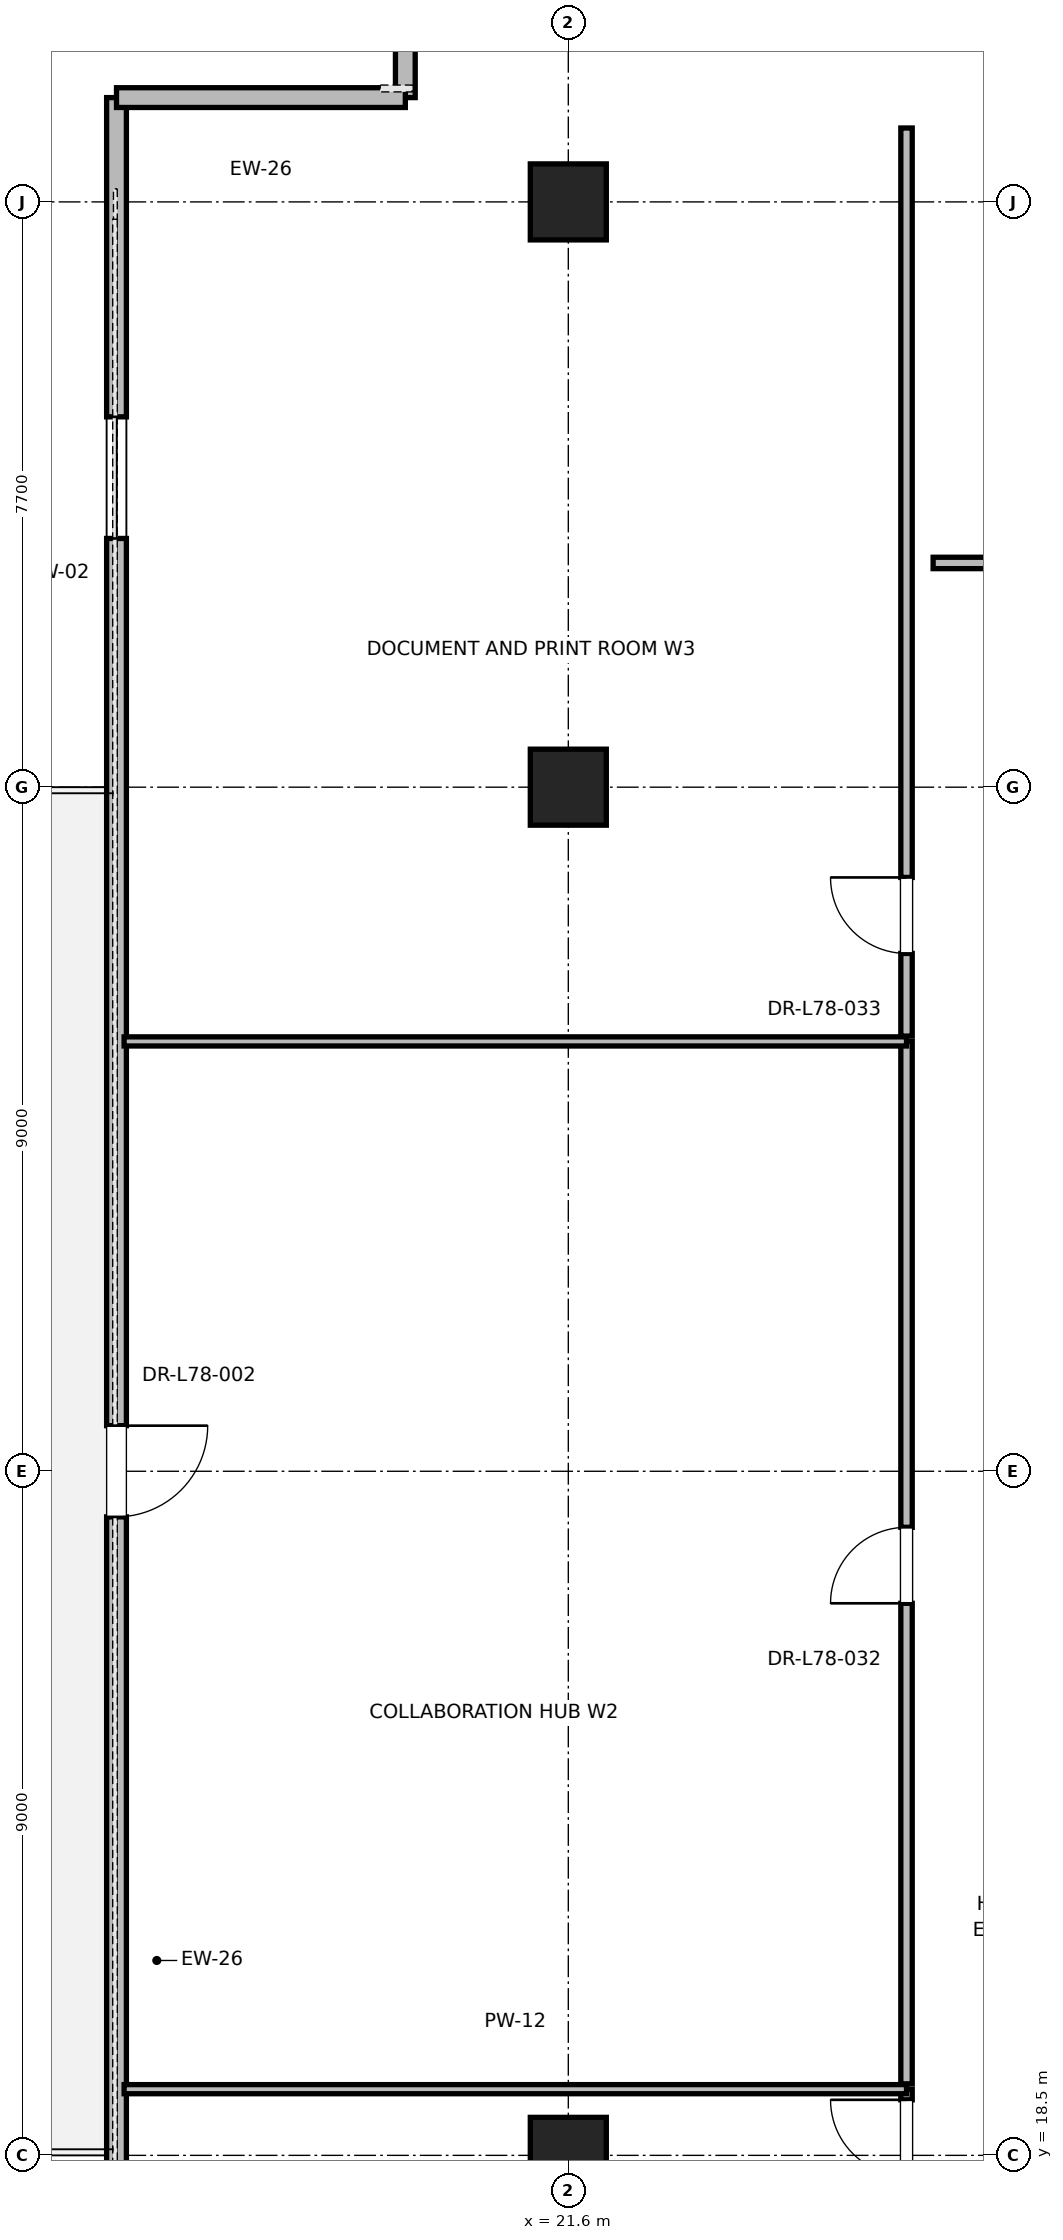
"""IFC4 building model, lengths in metres.
Left out: names, types, materials, properties, quantities, classifications, styles, units other than length and angle.
Written with IfcOpenShell. Run it as: python <this file> out.ifc"""

import sys

from ifc_helpers import new_model, si_unit, direction, frame, frame_2d, origin, origin_2d, place, context, subcontext, project, spatial, rectangle, extrude, element, fill, save


model = new_model("IFC4")
c1 = context("Model", 3, precision=1e-05, world=origin(), true_north=direction((0.0, 1.0)))
c2 = subcontext(c1, "Body", "Model", "MODEL_VIEW")
j1 = project(units=[si_unit("LENGTHUNIT", "METRE"), si_unit("PLANEANGLEUNIT", "RADIAN")], contexts=[c1])
p1 = place(None, origin())
s1 = spatial("IfcSite", under=j1, at=p1, CompositionType="ELEMENT")
p2 = place(p1, origin())
s2 = spatial("IfcBuilding", under=s1, at=p2, CompositionType="ELEMENT")
p3 = place(p2, frame((0.0, 0.0, 334.8)))
s3 = spatial("IfcBuildingStorey", under=s2, at=p3, CompositionType="ELEMENT", Elevation=334.8)
for number, where, z_axis, x_axis in (
    (1, (21.6, 18.5, 0.0), (0.0, 0.0, 1.0), (1.0, 0.0, 0.0)),
    (2, (21.6, 36.5, 0.0), (0.0, 0.0, 1.0), (1.0, 0.0, 0.0)),
    (3, (21.6, 44.2, 0.0), (0.0, 0.0, 1.0), (1.0, 0.0, 0.0)),
):
    element("IfcColumn", number, at=place(p3, frame(where, z_axis=z_axis, x_axis=x_axis)), inside=s3, PredefinedType="COLUMN", context=c2, shape_type="SweptSolid", body=[
        extrude(rectangle(XDim=1.0, YDim=1.0, at=origin_2d()), origin(), (0.0, 0.0, 1.0), 4.0),
    ])
p4 = place(p3, frame((15.656, 45.572, 0.0), z_axis=(0.0, 0.0, 1.0), x_axis=(0.0, -1.0, 0.0)))
e4 = element("IfcWall", 4, at=p4, inside=s3, PredefinedType="PARAPET", context=c2, shape_type="SweptSolid", body=[
    extrude(rectangle(XDim=36.145, YDim=0.26, at=frame_2d((18.072, 0.0))), origin(), (0.0, 0.0, 1.0), 3.196),
])
p5 = place(p4, frame((4.2, 0.0, 0.85)))
e5 = element("IfcOpeningElement", 5, at=p5, cuts=e4, PredefinedType="OPENING", context=c2, shape_type="SweptSolid", body=[
    extrude(rectangle(XDim=1.6, YDim=2.1, at=frame_2d((0.8, 1.05))), frame((0.0, 0.13, 0.0), z_axis=(0.0, -1.0, 0.0), x_axis=(1.0, 0.0, 0.0)), (0.0, 0.0, 1.0), 0.26),
])
p6 = place(p4, frame((17.472, 0.0, 0.0)))
e6 = element("IfcOpeningElement", 6, at=p6, cuts=e4, PredefinedType="OPENING", context=c2, shape_type="SweptSolid", body=[
    extrude(rectangle(XDim=1.2, YDim=2.2, at=frame_2d((0.6, 1.1))), frame((0.0, 0.13, 0.0), z_axis=(0.0, -1.0, 0.0), x_axis=(1.0, 0.0, 0.0)), (0.0, 0.0, 1.0), 0.26),
])
p7 = place(p4, frame((30.344, 0.0, 0.85)))
e7 = element("IfcOpeningElement", 7, at=p7, cuts=e4, PredefinedType="OPENING", context=c2, shape_type="SweptSolid", body=[
    extrude(rectangle(XDim=1.6, YDim=2.1, at=frame_2d((0.8, 1.05))), frame((0.0, 0.13, 0.0), z_axis=(0.0, -1.0, 0.0), x_axis=(1.0, 0.0, 0.0)), (0.0, 0.0, 1.0), 0.26),
])
p8 = place(p3, frame((19.456, 48.872, 0.0), z_axis=(0.0, 0.0, 1.0), x_axis=(0.0, -1.0, 0.0)))
e8 = element("IfcWall", 8, at=p8, inside=s3, PredefinedType="PARAPET", context=c2, shape_type="SweptSolid", body=[
    extrude(rectangle(XDim=3.3, YDim=0.26, at=frame_2d((1.65, 0.0))), origin(), (0.0, 0.0, 1.0), 3.785),
])
p9 = place(p8, frame((0.75, 0.0, 0.85)))
e9 = element("IfcOpeningElement", 9, at=p9, cuts=e8, PredefinedType="OPENING", context=c2, shape_type="SweptSolid", body=[
    extrude(rectangle(XDim=1.8, YDim=2.2, at=frame_2d((0.9, 1.1))), frame((0.0, 0.13, 0.0), z_axis=(0.0, -1.0, 0.0), x_axis=(1.0, 0.0, 0.0)), (0.0, 0.0, 1.0), 0.26),
])
p10 = place(p3, frame((19.456, 45.572, 0.0), z_axis=(0.0, 0.0, 1.0), x_axis=(-1.0, 0.0, 0.0)))
e10 = element("IfcWall", 10, at=p10, inside=s3, PredefinedType="PARAPET", context=c2, shape_type="SweptSolid", body=[
    extrude(rectangle(XDim=3.8, YDim=0.26, at=frame_2d((1.9, 0.0))), origin(), (0.0, 0.0, 1.0), 3.785),
])
p11 = place(p3, frame((26.4, 39.45, 0.0), z_axis=(0.0, 0.0, 1.0), x_axis=(1.0, 0.0, 0.0)))
e11 = element("IfcWall", 11, at=p11, inside=s3, PredefinedType="PARTITIONING", context=c2, shape_type="SweptSolid", body=[
    extrude(rectangle(XDim=3.808, YDim=0.15, at=frame_2d((1.904, 0.0))), origin(), (0.0, 0.0, 1.0), 2.85),
])
p12 = place(p11, frame((1.419, 0.0, 0.0)))
e12 = element("IfcOpeningElement", 12, at=p12, cuts=e11, PredefinedType="OPENING", context=c2, shape_type="SweptSolid", body=[
    extrude(rectangle(XDim=1.0, YDim=2.15, at=frame_2d((0.5, 1.075))), frame((0.0, 0.075, 0.0), z_axis=(0.0, -1.0, 0.0), x_axis=(1.0, 0.0, 0.0)), (0.0, 0.0, 1.0), 0.15),
])
p13 = place(p3, frame((26.05, 9.828, 0.0), z_axis=(0.0, 0.0, 1.0), x_axis=(0.0, 1.0, 0.0)))
e13 = element("IfcWall", 13, at=p13, inside=s3, PredefinedType="PARTITIONING", context=c2, shape_type="SweptSolid", body=[
    extrude(rectangle(XDim=9.543, YDim=0.15, at=frame_2d((4.771, 0.0))), origin(), (0.0, 0.0, 1.0), 2.85),
])
p14 = place(p13, frame((8.403, 0.0, 0.0)))
e14 = element("IfcOpeningElement", 14, at=p14, cuts=e13, PredefinedType="OPENING", context=c2, shape_type="SweptSolid", body=[
    extrude(rectangle(XDim=1.0, YDim=2.15, at=frame_2d((0.5, 1.075))), frame((0.0, 0.075, 0.0), z_axis=(0.0, -1.0, 0.0), x_axis=(1.0, 0.0, 0.0)), (0.0, 0.0, 1.0), 0.15),
])
p15 = place(p3, frame((15.756, 19.371, 0.0), z_axis=(0.0, 0.0, 1.0), x_axis=(1.0, 0.0, 0.0)))
e15 = element("IfcWall", 15, at=p15, inside=s3, PredefinedType="PARTITIONING", context=c2, shape_type="SweptSolid", body=[
    extrude(rectangle(XDim=10.294, YDim=0.12, at=frame_2d((5.147, 0.0))), origin(), (0.0, 0.0, 1.0), 2.85),
])
p16 = place(p3, frame((26.05, 19.441, 0.0), z_axis=(0.0, 0.0, 1.0), x_axis=(0.0, 1.0, 0.0)))
e16 = element("IfcWall", 16, at=p16, inside=s3, PredefinedType="PARTITIONING", context=c2, shape_type="SweptSolid", body=[
    extrude(rectangle(XDim=13.714, YDim=0.15, at=frame_2d((6.857, 0.0))), origin(), (0.0, 0.0, 1.0), 2.85),
])
p17 = place(p16, frame((6.322, 0.0, 0.0)))
e17 = element("IfcOpeningElement", 17, at=p17, cuts=e16, PredefinedType="OPENING", context=c2, shape_type="SweptSolid", body=[
    extrude(rectangle(XDim=1.0, YDim=2.15, at=frame_2d((0.5, 1.075))), frame((0.0, 0.075, 0.0), z_axis=(0.0, -1.0, 0.0), x_axis=(1.0, 0.0, 0.0)), (0.0, 0.0, 1.0), 0.15),
])
p18 = place(p3, frame((15.756, 33.155, 0.0), z_axis=(0.0, 0.0, 1.0), x_axis=(1.0, 0.0, 0.0)))
e18 = element("IfcWall", 18, at=p18, inside=s3, PredefinedType="PARTITIONING", context=c2, shape_type="SweptSolid", body=[
    extrude(rectangle(XDim=10.294, YDim=0.12, at=frame_2d((5.147, 0.0))), origin(), (0.0, 0.0, 1.0), 2.85),
])
p19 = place(p3, frame((26.05, 33.225, 0.0), z_axis=(0.0, 0.0, 1.0), x_axis=(0.0, 1.0, 0.0)))
e19 = element("IfcWall", 19, at=p19, inside=s3, PredefinedType="PARTITIONING", context=c2, shape_type="SweptSolid", body=[
    extrude(rectangle(XDim=11.947, YDim=0.15, at=frame_2d((5.974, 0.0))), origin(), (0.0, 0.0, 1.0), 2.85),
])
p20 = place(p19, frame((1.087, 0.0, 0.0)))
e20 = element("IfcOpeningElement", 20, at=p20, cuts=e19, PredefinedType="OPENING", context=c2, shape_type="SweptSolid", body=[
    extrude(rectangle(XDim=1.0, YDim=2.15, at=frame_2d((0.5, 1.075))), frame((0.0, 0.075, 0.0), z_axis=(0.0, -1.0, 0.0), x_axis=(1.0, 0.0, 0.0)), (0.0, 0.0, 1.0), 0.15),
])
p21 = place(p5, origin())
e21 = element("IfcWindow", 21, at=p21, inside=s3, PartitioningType="SINGLE_PANEL", PredefinedType="WINDOW", context=c2, shape_type="SweptSolid", body=[
    extrude(rectangle(XDim=1.6, YDim=2.1, at=frame_2d((0.8, 1.05))), frame((0.0, 0.03, 0.0), z_axis=(0.0, -1.0, 0.0), x_axis=(1.0, 0.0, 0.0)), (0.0, 0.0, 1.0), 0.06),
])
fill(e5, e21)
p22 = place(p6, origin())
e22 = element("IfcDoor", 22, at=p22, inside=s3, OperationType="SINGLE_SWING_LEFT", PredefinedType="DOOR", context=c2, shape_type="SweptSolid", body=[
    extrude(rectangle(XDim=1.2, YDim=2.2, at=frame_2d((0.6, 1.1))), frame((0.0, 0.025, 0.0), z_axis=(0.0, -1.0, 0.0), x_axis=(1.0, 0.0, 0.0)), (0.0, 0.0, 1.0), 0.05),
])
fill(e6, e22)
p23 = place(p14, origin())
e23 = element("IfcDoor", 23, at=p23, inside=s3, OperationType="SINGLE_SWING_RIGHT", PredefinedType="DOOR", context=c2, shape_type="SweptSolid", body=[
    extrude(rectangle(XDim=1.0, YDim=2.15, at=frame_2d((0.5, 1.075))), frame((0.0, 0.025, 0.0), z_axis=(0.0, -1.0, 0.0), x_axis=(1.0, 0.0, 0.0)), (0.0, 0.0, 1.0), 0.05),
])
fill(e14, e23)
p24 = place(p17, origin())
e24 = element("IfcDoor", 24, at=p24, inside=s3, OperationType="SINGLE_SWING_LEFT", PredefinedType="DOOR", context=c2, shape_type="SweptSolid", body=[
    extrude(rectangle(XDim=1.0, YDim=2.15, at=frame_2d((0.5, 1.075))), frame((0.0, 0.025, 0.0), z_axis=(0.0, -1.0, 0.0), x_axis=(1.0, 0.0, 0.0)), (0.0, 0.0, 1.0), 0.05),
])
fill(e17, e24)
p25 = place(p20, origin())
e25 = element("IfcDoor", 25, at=p25, inside=s3, OperationType="SINGLE_SWING_RIGHT", PredefinedType="DOOR", context=c2, shape_type="SweptSolid", body=[
    extrude(rectangle(XDim=1.0, YDim=2.15, at=frame_2d((0.5, 1.075))), frame((0.0, 0.025, 0.0), z_axis=(0.0, -1.0, 0.0), x_axis=(1.0, 0.0, 0.0)), (0.0, 0.0, 1.0), 0.05),
])
fill(e20, e25)
save(model, sys.argv[1])
